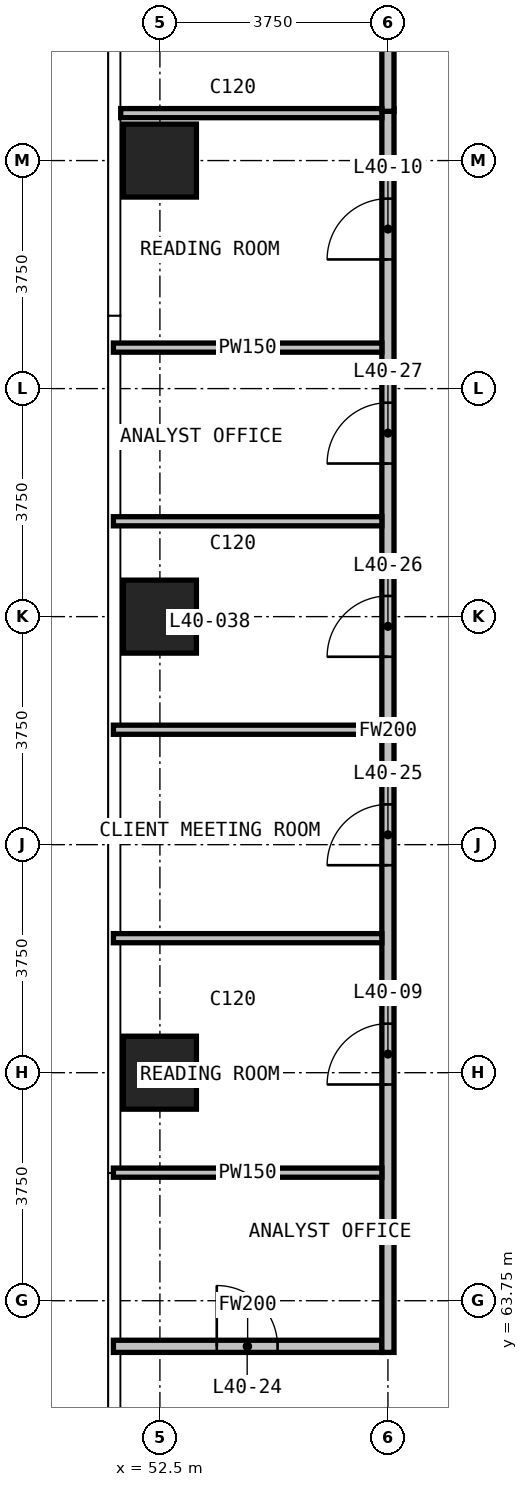
"""IFC4 building model, lengths in metres.
Left out: names, types, materials, properties, quantities, classifications, styles, units other than length and angle.
Written with IfcOpenShell. Run it as: python <this file> out.ifc"""

import sys

from ifc_helpers import new_model, si_unit, direction, frame, frame_2d, origin, origin_2d, place, context, subcontext, project, spatial, rectangle, extrude, element, fill, save


model = new_model("IFC4")
c1 = context("Model", 3, precision=1e-05, world=origin(), true_north=direction((0.0, 1.0)))
c2 = subcontext(c1, "Body", "Model", "MODEL_VIEW")
j1 = project(units=[si_unit("LENGTHUNIT", "METRE"), si_unit("PLANEANGLEUNIT", "RADIAN")], contexts=[c1])
p1 = place(None, origin())
s1 = spatial("IfcSite", under=j1, at=p1, CompositionType="ELEMENT")
p2 = place(p1, origin())
s2 = spatial("IfcBuilding", under=s1, at=p2, CompositionType="ELEMENT")
p3 = place(p2, frame((0.0, 0.0, 158.5)))
s3 = spatial("IfcBuildingStorey", under=s2, at=p3, CompositionType="ELEMENT", Elevation=158.5)
for number, where, z_axis, x_axis in (
    (1, (52.5, 67.5, 0.0), (0.0, 0.0, 1.0), (1.0, 0.0, 0.0)),
    (2, (52.5, 75.0, 0.0), (0.0, 0.0, 1.0), (1.0, 0.0, 0.0)),
    (3, (52.5, 82.5, 0.0), (0.0, 0.0, 1.0), (1.0, 0.0, 0.0)),
):
    element("IfcColumn", number, at=place(p3, frame(where, z_axis=z_axis, x_axis=x_axis)), inside=s3, PredefinedType="COLUMN", context=c2, shape_type="SweptSolid", body=[
        extrude(rectangle(XDim=1.2, YDim=1.2, at=origin_2d()), origin(), (0.0, 0.0, 1.0), 3.6),
    ])
p4 = place(p3, frame((51.735, 63.0, 0.0), z_axis=(0.0, 0.0, 1.0), x_axis=(1.0, 0.0, 0.0)))
e4 = element("IfcWall", 4, at=p4, inside=s3, PredefinedType="PARTITIONING", context=c2, shape_type="SweptSolid", body=[
    extrude(rectangle(XDim=4.415, YDim=0.2, at=frame_2d((2.208, 0.0))), origin(), (0.0, 0.0, 1.0), 3.3),
])
p5 = place(p4, frame((1.7, 0.0, 0.0)))
e5 = element("IfcOpeningElement", 5, at=p5, cuts=e4, PredefinedType="OPENING", context=c2, shape_type="SweptSolid", body=[
    extrude(rectangle(XDim=1.0, YDim=2.2, at=frame_2d((0.5, 1.1))), frame((0.0, 0.11, 0.0), z_axis=(0.0, -1.0, 0.0), x_axis=(1.0, 0.0, 0.0)), (0.0, 0.0, 1.0), 0.22),
])
p6 = place(p3, frame((56.25, 62.9, 0.0), z_axis=(0.0, 0.0, 1.0), x_axis=(0.0, 1.0, 0.0)))
e6 = element("IfcWall", 6, at=p6, inside=s3, PredefinedType="PARTITIONING", context=c2, shape_type="SweptSolid", body=[
    extrude(rectangle(XDim=20.455, YDim=0.2, at=frame_2d((10.228, 0.0))), origin(), (0.0, 0.0, 1.0), 3.3),
])
p7 = place(p6, frame((4.406, 0.0, 0.0)))
e7 = element("IfcOpeningElement", 7, at=p7, cuts=e6, PredefinedType="OPENING", context=c2, shape_type="SweptSolid", body=[
    extrude(rectangle(XDim=1.0, YDim=2.2, at=frame_2d((0.5, 1.1))), frame((0.0, 0.11, 0.0), z_axis=(0.0, -1.0, 0.0), x_axis=(1.0, 0.0, 0.0)), (0.0, 0.0, 1.0), 0.22),
])
p8 = place(p6, frame((17.974, 0.0, 0.0)))
e8 = element("IfcOpeningElement", 8, at=p8, cuts=e6, PredefinedType="OPENING", context=c2, shape_type="SweptSolid", body=[
    extrude(rectangle(XDim=1.0, YDim=2.2, at=frame_2d((0.5, 1.1))), frame((0.0, 0.11, 0.0), z_axis=(0.0, -1.0, 0.0), x_axis=(1.0, 0.0, 0.0)), (0.0, 0.0, 1.0), 0.22),
])
p9 = place(p6, frame((8.012, 0.0, 0.0)))
e9 = element("IfcOpeningElement", 9, at=p9, cuts=e6, PredefinedType="OPENING", context=c2, shape_type="SweptSolid", body=[
    extrude(rectangle(XDim=1.0, YDim=2.2, at=frame_2d((0.5, 1.1))), frame((0.0, 0.11, 0.0), z_axis=(0.0, -1.0, 0.0), x_axis=(1.0, 0.0, 0.0)), (0.0, 0.0, 1.0), 0.22),
])
p10 = place(p6, frame((11.44, 0.0, 0.0)))
e10 = element("IfcOpeningElement", 10, at=p10, cuts=e6, PredefinedType="OPENING", context=c2, shape_type="SweptSolid", body=[
    extrude(rectangle(XDim=1.0, YDim=2.2, at=frame_2d((0.5, 1.1))), frame((0.0, 0.11, 0.0), z_axis=(0.0, -1.0, 0.0), x_axis=(1.0, 0.0, 0.0)), (0.0, 0.0, 1.0), 0.22),
])
p11 = place(p6, frame((14.618, 0.0, 0.0)))
e11 = element("IfcOpeningElement", 11, at=p11, cuts=e6, PredefinedType="OPENING", context=c2, shape_type="SweptSolid", body=[
    extrude(rectangle(XDim=1.0, YDim=2.2, at=frame_2d((0.5, 1.1))), frame((0.0, 0.11, 0.0), z_axis=(0.0, -1.0, 0.0), x_axis=(1.0, 0.0, 0.0)), (0.0, 0.0, 1.0), 0.22),
])
p12 = place(p3, frame((56.25, 83.31, 0.0), z_axis=(0.0, 0.0, 1.0), x_axis=(0.0, 1.0, 0.0)))
e12 = element("IfcWall", 12, at=p12, inside=s3, PredefinedType="PARTITIONING", context=c2, shape_type="SweptSolid", body=[
    extrude(rectangle(XDim=7.335, YDim=0.2, at=frame_2d((3.667, 0.0))), origin(), (0.0, 0.0, 1.0), 3.3),
])
for number, where, z_axis, x_axis in (
    (13, (51.735, 65.856, 0.0), (0.0, 0.0, 1.0), (1.0, 0.0, 0.0)),
    (14, (51.735, 69.712, 0.0), (0.0, 0.0, 1.0), (1.0, 0.0, 0.0)),
    (15, (51.735, 73.14, 0.0), (0.0, 0.0, 1.0), (1.0, 0.0, 0.0)),
    (16, (51.735, 76.568, 0.0), (0.0, 0.0, 1.0), (1.0, 0.0, 0.0)),
    (17, (51.735, 79.424, 0.0), (0.0, 0.0, 1.0), (1.0, 0.0, 0.0)),
):
    element("IfcWall", number, at=place(p3, frame(where, z_axis=z_axis, x_axis=x_axis)), inside=s3, PredefinedType="PARTITIONING", context=c2, shape_type="SweptSolid", body=[
        extrude(rectangle(XDim=4.415, YDim=0.15, at=frame_2d((2.208, 0.0))), origin(), (0.0, 0.0, 1.0), 3.3),
    ])
p13 = place(p3, frame((51.855, 83.28, 0.0), z_axis=(0.0, 0.0, 1.0), x_axis=(1.0, 0.0, 0.0)))
e18 = element("IfcWall", 18, at=p13, inside=s3, PredefinedType="PARTITIONING", context=c2, shape_type="SweptSolid", body=[
    extrude(rectangle(XDim=4.295, YDim=0.15, at=frame_2d((2.147, 0.0))), origin(), (0.0, 0.0, 1.0), 3.3),
])
p14 = place(p7, origin())
e19 = element("IfcDoor", 19, at=p14, inside=s3, OperationType="SINGLE_SWING_LEFT", PredefinedType="DOOR", context=c2, shape_type="SweptSolid", body=[
    extrude(rectangle(XDim=1.0, YDim=2.2, at=frame_2d((0.5, 1.1))), frame((0.0, 0.025, 0.0), z_axis=(0.0, -1.0, 0.0), x_axis=(1.0, 0.0, 0.0)), (0.0, 0.0, 1.0), 0.05),
])
fill(e7, e19)
p15 = place(p8, origin())
e20 = element("IfcDoor", 20, at=p15, inside=s3, OperationType="SINGLE_SWING_LEFT", PredefinedType="DOOR", context=c2, shape_type="SweptSolid", body=[
    extrude(rectangle(XDim=1.0, YDim=2.2, at=frame_2d((0.5, 1.1))), frame((0.0, 0.025, 0.0), z_axis=(0.0, -1.0, 0.0), x_axis=(1.0, 0.0, 0.0)), (0.0, 0.0, 1.0), 0.05),
])
fill(e8, e20)
p16 = place(p5, origin())
e21 = element("IfcDoor", 21, at=p16, inside=s3, OperationType="SINGLE_SWING_RIGHT", PredefinedType="DOOR", context=c2, shape_type="SweptSolid", body=[
    extrude(rectangle(XDim=1.0, YDim=2.2, at=frame_2d((0.5, 1.1))), frame((0.0, 0.025, 0.0), z_axis=(0.0, -1.0, 0.0), x_axis=(1.0, 0.0, 0.0)), (0.0, 0.0, 1.0), 0.05),
])
fill(e5, e21)
p17 = place(p9, origin())
e22 = element("IfcDoor", 22, at=p17, inside=s3, OperationType="SINGLE_SWING_RIGHT", PredefinedType="DOOR", context=c2, shape_type="SweptSolid", body=[
    extrude(rectangle(XDim=1.0, YDim=2.2, at=frame_2d((0.5, 1.1))), frame((0.0, 0.025, 0.0), z_axis=(0.0, -1.0, 0.0), x_axis=(1.0, 0.0, 0.0)), (0.0, 0.0, 1.0), 0.05),
])
fill(e9, e22)
p18 = place(p10, origin())
e23 = element("IfcDoor", 23, at=p18, inside=s3, OperationType="SINGLE_SWING_RIGHT", PredefinedType="DOOR", context=c2, shape_type="SweptSolid", body=[
    extrude(rectangle(XDim=1.0, YDim=2.2, at=frame_2d((0.5, 1.1))), frame((0.0, 0.025, 0.0), z_axis=(0.0, -1.0, 0.0), x_axis=(1.0, 0.0, 0.0)), (0.0, 0.0, 1.0), 0.05),
])
fill(e10, e23)
p19 = place(p11, origin())
e24 = element("IfcDoor", 24, at=p19, inside=s3, OperationType="SINGLE_SWING_LEFT", PredefinedType="DOOR", context=c2, shape_type="SweptSolid", body=[
    extrude(rectangle(XDim=1.0, YDim=2.2, at=frame_2d((0.5, 1.1))), frame((0.0, 0.025, 0.0), z_axis=(0.0, -1.0, 0.0), x_axis=(1.0, 0.0, 0.0)), (0.0, 0.0, 1.0), 0.05),
])
fill(e11, e24)
save(model, sys.argv[1])
